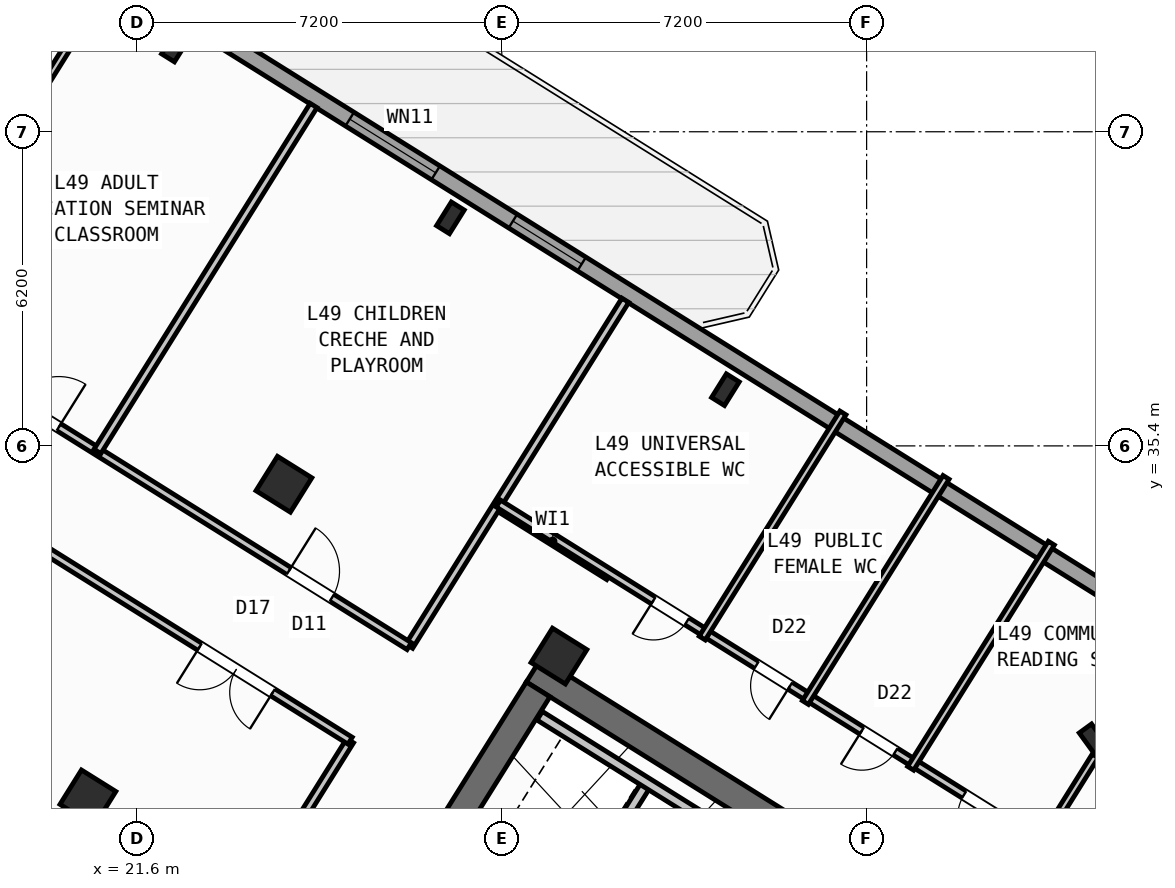
"""IFC4 building model, lengths in metres.
Left out: names, types, materials, properties, quantities, classifications, styles, units other than length and angle.
Written with IfcOpenShell. Run it as: python <this file> out.ifc"""

import sys

from ifc_helpers import new_model, si_unit, direction, frame, frame_2d, origin, origin_2d, place, context, subcontext, project, spatial, rectangle, hollow_rectangle, i_section, extrude, source, transform, mapped, element, fill, save


model = new_model("IFC4")
c1 = context("Model", 3, precision=1e-05, world=origin(), true_north=direction((0.0, 1.0)))
c2 = subcontext(c1, "Body", "Model", "MODEL_VIEW")
j1 = project(units=[si_unit("LENGTHUNIT", "METRE"), si_unit("PLANEANGLEUNIT", "RADIAN")], contexts=[c1])
p1 = place(None, origin())
s1 = spatial("IfcSite", under=j1, at=p1, CompositionType="ELEMENT")
p2 = place(p1, origin())
s2 = spatial("IfcBuilding", under=s1, at=p2, CompositionType="ELEMENT")
p3 = place(p2, frame((0.0, 0.0, 195.0)))
s3 = spatial("IfcBuildingStorey", under=s2, at=p3, CompositionType="ELEMENT", Elevation=195.0)
p4 = place(p3, frame((40.573, 24.01, 0.0), z_axis=(0.0, 0.0, 1.0), x_axis=(-0.848047359947, 0.529920442413, 0.0)))
e1 = element("IfcWall", 1, at=p4, inside=s3, PredefinedType="SHEAR", context=c2, shape_type="SweptSolid", body=[
    extrude(rectangle(XDim=13.14, YDim=0.55, at=frame_2d((6.57, 0.0))), origin(), (0.0, 0.0, 1.0), 4.22),
])
p5 = place(p3, frame((29.517, 30.594, 0.0), z_axis=(0.0, 0.0, 1.0), x_axis=(-0.529906864564, -0.848055844204, 0.0)))
e2 = element("IfcWall", 2, at=p5, inside=s3, PredefinedType="SHEAR", context=c2, shape_type="SweptSolid", body=[
    extrude(rectangle(XDim=3.575, YDim=0.55, at=frame_2d((1.788, 0.0))), origin(), (0.0, 0.0, 1.0), 4.22),
])
m1 = source(origin(), c2, "Body", "SweptSolid", [
    extrude(i_section(OverallWidth=0.3, OverallDepth=0.55, WebThickness=0.015, FlangeThickness=0.029, at=origin_2d()), origin(), (0.0, 0.0, 1.0), 4.5),
])
p6 = place(p3, frame((33.213, 36.509, 0.0), z_axis=(0.0, 0.0, 1.0), x_axis=(-0.848048096156, 0.529919264233, 0.0)))
e3 = element("IfcColumn", 3, at=p6, inside=s3, PredefinedType="COLUMN", context=c2, shape_type="MappedRepresentation", body=[
    mapped(m1, transform((0.0, 0.0, 0.0), scale=1.0)),
])
m2 = source(origin(), c2, "Body", "SweptSolid", [
    extrude(hollow_rectangle(XDim=0.8, YDim=0.8, WallThickness=0.032, at=origin_2d()), origin(), (0.0, 0.0, 1.0), 4.5),
])
p7 = place(p3, frame((29.928, 31.251, 0.0), z_axis=(0.0, 0.0, 1.0), x_axis=(-0.848048096156, 0.529919264233, 0.0)))
e4 = element("IfcColumn", 4, at=p7, inside=s3, PredefinedType="COLUMN", context=c2, shape_type="MappedRepresentation", body=[
    mapped(m2, transform((0.0, 0.0, 0.0), scale=1.0)),
])
p8 = place(p3, frame((27.786, 39.901, 0.0), z_axis=(0.0, 0.0, 1.0), x_axis=(-0.848048096156, 0.529919264233, 0.0)))
e5 = element("IfcColumn", 5, at=p8, inside=s3, PredefinedType="COLUMN", context=c2, shape_type="MappedRepresentation", body=[
    mapped(m1, transform((0.0, 0.0, 0.0), scale=1.0)),
])
for number, where, z_axis, x_axis in (
    (6, (24.5, 34.643, 0.0), (0.0, 0.0, 1.0), (-0.848, 0.53, 0.0)),
    (7, (20.632, 28.452, 0.0), (0.0, 0.0, 1.0), (-0.848, 0.53, 0.0)),
):
    element("IfcColumn", number, at=place(p3, frame(where, z_axis=z_axis, x_axis=x_axis)), inside=s3, PredefinedType="COLUMN", context=c2, shape_type="MappedRepresentation", body=[
        mapped(m2, transform((0.0, 0.0, 0.0), scale=1.0)),
    ])
for number, where, z_axis, x_axis in (
    (8, (22.358, 43.292, 0.0), (0.0, 0.0, 1.0), (-0.848, 0.53, 0.0)),
    (9, (40.479, 29.601, 0.0), (0.0, 0.0, 1.0), (0.809, 0.588, 0.0)),
):
    element("IfcColumn", number, at=place(p3, frame(where, z_axis=z_axis, x_axis=x_axis)), inside=s3, PredefinedType="COLUMN", context=c2, shape_type="MappedRepresentation", body=[
        mapped(m1, transform((0.0, 0.0, 0.0), scale=1.0)),
    ])
p9 = place(p3, frame((31.76, 12.183, 0.0), z_axis=(0.0, 0.0, 1.0), x_axis=(-0.848047074256, 0.529920899612, 0.0)))
e10 = element("IfcWall", 10, at=p9, inside=s3, PredefinedType="STANDARD", context=c2, shape_type="SweptSolid", body=[
    extrude(rectangle(XDim=30.652, YDim=0.32, at=frame_2d((15.326, 0.0))), origin(), (0.0, 0.0, 1.0), 4.22),
])
p10 = place(p9, frame((15.166, 0.0, 0.0)))
e11 = element("IfcOpeningElement", 11, at=p10, cuts=e10, PredefinedType="OPENING", context=c2, shape_type="SweptSolid", body=[
    extrude(rectangle(XDim=1.2, YDim=2.15, at=frame_2d((0.6, 1.075))), frame((0.0, 0.17, 0.0), z_axis=(0.0, -1.0, 0.0), x_axis=(1.0, 0.0, 0.0)), (0.0, 0.0, 1.0), 0.34),
])
p11 = place(p9, frame((1.765, 0.0, 0.7)))
e12 = element("IfcOpeningElement", 12, at=p11, cuts=e10, PredefinedType="OPENING", context=c2, shape_type="SweptSolid", body=[
    extrude(rectangle(XDim=2.6, YDim=2.0, at=frame_2d((1.3, 1.0))), frame((0.0, 0.17, 0.0), z_axis=(0.0, -1.0, 0.0), x_axis=(1.0, 0.0, 0.0)), (0.0, 0.0, 1.0), 0.34),
])
p12 = place(p9, frame((6.994, 0.0, 0.7)))
e13 = element("IfcOpeningElement", 13, at=p12, cuts=e10, PredefinedType="OPENING", context=c2, shape_type="SweptSolid", body=[
    extrude(rectangle(XDim=2.6, YDim=2.0, at=frame_2d((1.3, 1.0))), frame((0.0, 0.17, 0.0), z_axis=(0.0, -1.0, 0.0), x_axis=(1.0, 0.0, 0.0)), (0.0, 0.0, 1.0), 0.34),
])
p13 = place(p9, frame((19.101, 0.0, 0.85)))
e14 = element("IfcOpeningElement", 14, at=p13, cuts=e10, PredefinedType="OPENING", context=c2, shape_type="SweptSolid", body=[
    extrude(rectangle(XDim=1.6, YDim=1.8, at=frame_2d((0.8, 0.9))), frame((0.0, 0.17, 0.0), z_axis=(0.0, -1.0, 0.0), x_axis=(1.0, 0.0, 0.0)), (0.0, 0.0, 1.0), 0.34),
])
p14 = place(p9, frame((26.358, 0.0, 0.7)))
e15 = element("IfcOpeningElement", 15, at=p14, cuts=e10, PredefinedType="OPENING", context=c2, shape_type="SweptSolid", body=[
    extrude(rectangle(XDim=2.6, YDim=2.0, at=frame_2d((1.3, 1.0))), frame((0.0, 0.17, 0.0), z_axis=(0.0, -1.0, 0.0), x_axis=(1.0, 0.0, 0.0)), (0.0, 0.0, 1.0), 0.34),
])
p15 = place(p3, frame((17.424, 47.083, 0.0), z_axis=(0.0, 0.0, 1.0), x_axis=(0.848049927979, -0.529916332693, 0.0)))
e16 = element("IfcWall", 16, at=p15, inside=s3, PredefinedType="STANDARD", context=c2, shape_type="SweptSolid", body=[
    extrude(rectangle(XDim=29.223, YDim=0.32, at=frame_2d((14.612, 0.0))), origin(), (0.0, 0.0, 1.0), 4.22),
])
p16 = place(p15, frame((2.752, 0.0, 0.0)))
e17 = element("IfcOpeningElement", 17, at=p16, cuts=e16, PredefinedType="OPENING", context=c2, shape_type="SweptSolid", body=[
    extrude(rectangle(XDim=1.05, YDim=2.15, at=frame_2d((0.525, 1.075))), frame((0.0, 0.17, 0.0), z_axis=(0.0, -1.0, 0.0), x_axis=(1.0, 0.0, 0.0)), (0.0, 0.0, 1.0), 0.34),
])
p17 = place(p15, frame((0.641, 0.0, 0.85)))
e18 = element("IfcOpeningElement", 18, at=p17, cuts=e16, PredefinedType="OPENING", context=c2, shape_type="SweptSolid", body=[
    extrude(rectangle(XDim=1.6, YDim=1.8, at=frame_2d((0.8, 0.9))), frame((0.0, 0.17, 0.0), z_axis=(0.0, -1.0, 0.0), x_axis=(1.0, 0.0, 0.0)), (0.0, 0.0, 1.0), 0.34),
])
p18 = place(p15, frame((9.876, 0.0, 0.75)))
e19 = element("IfcOpeningElement", 19, at=p18, cuts=e16, PredefinedType="OPENING", context=c2, shape_type="SweptSolid", body=[
    extrude(rectangle(XDim=2.0, YDim=1.95, at=frame_2d((1.0, 0.975))), frame((0.0, 0.17, 0.0), z_axis=(0.0, -1.0, 0.0), x_axis=(1.0, 0.0, 0.0)), (0.0, 0.0, 1.0), 0.34),
])
p19 = place(p15, frame((13.674, 0.0, 0.85)))
e20 = element("IfcOpeningElement", 20, at=p19, cuts=e16, PredefinedType="OPENING", context=c2, shape_type="SweptSolid", body=[
    extrude(rectangle(XDim=1.6, YDim=1.8, at=frame_2d((0.8, 0.9))), frame((0.0, 0.17, 0.0), z_axis=(0.0, -1.0, 0.0), x_axis=(1.0, 0.0, 0.0)), (0.0, 0.0, 1.0), 0.34),
])
p20 = place(p3, frame((31.645, 28.716, 0.0), z_axis=(0.0, 0.0, 1.0), x_axis=(-0.52986693015, -0.848080795876, 0.0)))
e21 = element("IfcWall", 21, at=p20, inside=s3, PredefinedType="STANDARD", context=c2, shape_type="SweptSolid", body=[
    extrude(rectangle(XDim=2.66, YDim=0.2, at=frame_2d((1.33, 0.0))), origin(), (0.0, 0.0, 1.0), 4.21),
])
p21 = place(p3, frame((33.363, 27.69, 0.0), z_axis=(0.0, 0.0, 1.0), x_axis=(-0.848047090064, 0.529920874315, 0.0)))
e22 = element("IfcWall", 22, at=p21, inside=s3, PredefinedType="STANDARD", context=c2, shape_type="SweptSolid", body=[
    extrude(rectangle(XDim=4.498, YDim=0.2, at=frame_2d((2.249, 0.0))), origin(), (0.0, 0.0, 1.0), 4.21),
])
p22 = place(p3, frame((30.914, 32.829, 0.0), z_axis=(0.0, 0.0, 1.0), x_axis=(-0.848008813643, 0.529982124211, 0.0)))
e23 = element("IfcWall", 23, at=p22, inside=s3, PredefinedType="PARTITIONING", context=c2, shape_type="SweptSolid", body=[
    extrude(rectangle(XDim=2.61, YDim=0.16, at=frame_2d((1.305, 0.0))), origin(), (0.0, 0.0, 1.0), 4.21),
])
p23 = place(p3, frame((31.239, 38.274, 0.0), z_axis=(0.0, 0.0, 1.0), x_axis=(-0.529928058306, -0.848042600947, 0.0)))
e24 = element("IfcWall", 24, at=p23, inside=s3, PredefinedType="PARTITIONING", context=c2, shape_type="SweptSolid", body=[
    extrude(rectangle(XDim=8.05, YDim=0.16, at=frame_2d((4.025, 0.0))), origin(), (0.0, 0.0, 1.0), 4.21),
])
p24 = place(p3, frame((25.807, 29.582, 0.0), z_axis=(0.0, 0.0, 1.0), x_axis=(-0.529920357077, -0.848047413271, 0.0)))
e25 = element("IfcWall", 25, at=p24, inside=s3, PredefinedType="PARTITIONING", context=c2, shape_type="SweptSolid", body=[
    extrude(rectangle(XDim=11.45, YDim=0.16, at=frame_2d((5.725, 0.0))), origin(), (0.0, 0.0, 1.0), 4.21),
])
p25 = place(p3, frame((26.973, 31.447, 0.0), z_axis=(0.0, 0.0, 1.0), x_axis=(-0.848048310262, 0.529918921593, 0.0)))
e26 = element("IfcWall", 26, at=p25, inside=s3, PredefinedType="PARTITIONING", context=c2, shape_type="SweptSolid", body=[
    extrude(rectangle(XDim=16.73, YDim=0.16, at=frame_2d((8.365, 0.0))), origin(), (0.0, 0.0, 1.0), 4.21),
])
p26 = place(p25, frame((1.8, 0.0, 0.0)))
e27 = element("IfcOpeningElement", 27, at=p26, cuts=e26, PredefinedType="OPENING", context=c2, shape_type="SweptSolid", body=[
    extrude(rectangle(XDim=1.0, YDim=2.1, at=frame_2d((0.5, 1.05))), frame((0.0, 0.09, 0.0), z_axis=(0.0, -1.0, 0.0), x_axis=(1.0, 0.0, 0.0)), (0.0, 0.0, 1.0), 0.18),
])
p27 = place(p25, frame((8.155, 0.0, 0.0)))
e28 = element("IfcOpeningElement", 28, at=p27, cuts=e26, PredefinedType="OPENING", context=c2, shape_type="SweptSolid", body=[
    extrude(rectangle(XDim=1.0, YDim=2.1, at=frame_2d((0.5, 1.05))), frame((0.0, 0.09, 0.0), z_axis=(0.0, -1.0, 0.0), x_axis=(1.0, 0.0, 0.0)), (0.0, 0.0, 1.0), 0.18),
])
p28 = place(p25, frame((12.882, 0.0, 0.0)))
e29 = element("IfcOpeningElement", 29, at=p28, cuts=e26, PredefinedType="OPENING", context=c2, shape_type="SweptSolid", body=[
    extrude(rectangle(XDim=1.0, YDim=2.1, at=frame_2d((0.5, 1.05))), frame((0.0, 0.09, 0.0), z_axis=(0.0, -1.0, 0.0), x_axis=(1.0, 0.0, 0.0)), (0.0, 0.0, 1.0), 0.18),
])
p29 = place(p3, frame((25.807, 29.582, 0.0), z_axis=(0.0, 0.0, 1.0), x_axis=(-0.848052408131, 0.529912363569, 0.0)))
e30 = element("IfcWall", 30, at=p29, inside=s3, PredefinedType="PARTITIONING", context=c2, shape_type="SweptSolid", body=[
    extrude(rectangle(XDim=16.73, YDim=0.16, at=frame_2d((8.365, 0.0))), origin(), (0.0, 0.0, 1.0), 4.21),
])
p30 = place(p29, frame((1.8, 0.0, 0.0)))
e31 = element("IfcOpeningElement", 31, at=p30, cuts=e30, PredefinedType="OPENING", context=c2, shape_type="SweptSolid", body=[
    extrude(rectangle(XDim=1.7, YDim=2.2, at=frame_2d((0.85, 1.1))), frame((0.0, 0.09, 0.0), z_axis=(0.0, -1.0, 0.0), x_axis=(1.0, 0.0, 0.0)), (0.0, 0.0, 1.0), 0.18),
])
p31 = place(p29, frame((8.655, 0.0, 0.0)))
e32 = element("IfcOpeningElement", 32, at=p31, cuts=e30, PredefinedType="OPENING", context=c2, shape_type="SweptSolid", body=[
    extrude(rectangle(XDim=1.7, YDim=2.2, at=frame_2d((0.85, 1.1))), frame((0.0, 0.09, 0.0), z_axis=(0.0, -1.0, 0.0), x_axis=(1.0, 0.0, 0.0)), (0.0, 0.0, 1.0), 0.18),
])
p32 = place(p3, frame((25.086, 42.118, 0.0), z_axis=(0.0, 0.0, 1.0), x_axis=(-0.529928058306, -0.848042600947, 0.0)))
e33 = element("IfcWall", 33, at=p32, inside=s3, PredefinedType="PARTITIONING", context=c2, shape_type="SweptSolid", body=[
    extrude(rectangle(XDim=8.05, YDim=0.16, at=frame_2d((4.025, 0.0))), origin(), (0.0, 0.0, 1.0), 4.21),
])
p33 = place(p3, frame((21.157, 44.751, 0.0), z_axis=(0.0, 0.0, 1.0), x_axis=(-0.529924004437, -0.84804513413, 0.0)))
e34 = element("IfcWall", 34, at=p33, inside=s3, PredefinedType="PLUMBINGWALL", context=c2, shape_type="SweptSolid", body=[
    extrude(rectangle(XDim=8.2, YDim=0.14, at=frame_2d((4.1, 0.0))), origin(), (0.0, 0.0, 1.0), 4.21),
])
p34 = place(p3, frame((41.936, 26.012, 0.0), z_axis=(0.0, 0.0, 1.0), x_axis=(-0.848051154596, 0.529914369676, 0.0)))
e35 = element("IfcWall", 35, at=p34, inside=s3, PredefinedType="PARTITIONING", context=c2, shape_type="SweptSolid", body=[
    extrude(rectangle(XDim=15.57, YDim=0.16, at=frame_2d((7.785, 0.0))), origin(), (0.0, 0.0, 1.0), 4.21),
])
p35 = place(p34, frame((0.85, 0.0, 0.0)))
e36 = element("IfcOpeningElement", 36, at=p35, cuts=e35, PredefinedType="OPENING", context=c2, shape_type="SweptSolid", body=[
    extrude(rectangle(XDim=0.86, YDim=2.05, at=frame_2d((0.43, 1.025))), frame((0.0, 0.09, 0.0), z_axis=(0.0, -1.0, 0.0), x_axis=(1.0, 0.0, 0.0)), (0.0, 0.0, 1.0), 0.18),
])
p36 = place(p34, frame((3.87, 0.0, 0.0)))
e37 = element("IfcOpeningElement", 37, at=p36, cuts=e35, PredefinedType="OPENING", context=c2, shape_type="SweptSolid", body=[
    extrude(rectangle(XDim=0.86, YDim=2.05, at=frame_2d((0.43, 1.025))), frame((0.0, 0.09, 0.0), z_axis=(0.0, -1.0, 0.0), x_axis=(1.0, 0.0, 0.0)), (0.0, 0.0, 1.0), 0.18),
])
p37 = place(p34, frame((6.33, 0.0, 0.0)))
e38 = element("IfcOpeningElement", 38, at=p37, cuts=e35, PredefinedType="OPENING", context=c2, shape_type="SweptSolid", body=[
    extrude(rectangle(XDim=0.78, YDim=2.05, at=frame_2d((0.39, 1.025))), frame((0.0, 0.09, 0.0), z_axis=(0.0, -1.0, 0.0), x_axis=(1.0, 0.0, 0.0)), (0.0, 0.0, 1.0), 0.18),
])
p38 = place(p34, frame((8.78, 0.0, 0.0)))
e39 = element("IfcOpeningElement", 39, at=p38, cuts=e35, PredefinedType="OPENING", context=c2, shape_type="SweptSolid", body=[
    extrude(rectangle(XDim=0.78, YDim=2.05, at=frame_2d((0.39, 1.025))), frame((0.0, 0.09, 0.0), z_axis=(0.0, -1.0, 0.0), x_axis=(1.0, 0.0, 0.0)), (0.0, 0.0, 1.0), 0.18),
])
p39 = place(p34, frame((11.18, 0.0, 0.0)))
e40 = element("IfcOpeningElement", 40, at=p39, cuts=e35, PredefinedType="OPENING", context=c2, shape_type="SweptSolid", body=[
    extrude(rectangle(XDim=0.78, YDim=2.05, at=frame_2d((0.39, 1.025))), frame((0.0, 0.09, 0.0), z_axis=(0.0, -1.0, 0.0), x_axis=(1.0, 0.0, 0.0)), (0.0, 0.0, 1.0), 0.18),
])
p40 = place(p3, frame((40.512, 29.281, 0.0), z_axis=(0.0, 0.0, 1.0), x_axis=(-0.529935255849, -0.848038103276, 0.0)))
e41 = element("IfcWall", 41, at=p40, inside=s3, PredefinedType="PLUMBINGWALL", context=c2, shape_type="SweptSolid", body=[
    extrude(rectangle(XDim=2.068, YDim=0.14, at=frame_2d((1.034, 0.0))), origin(), (0.0, 0.0, 1.0), 4.21),
])
for number, where, z_axis, x_axis in (
    (42, (39.646, 33.48, 0.0), (0.0, 0.0, 1.0), (-0.53, -0.848, 0.0)),
    (43, (37.568, 34.779, 0.0), (0.0, 0.0, 1.0), (-0.53, -0.848, 0.0)),
    (44, (35.533, 36.051, 0.0), (0.0, 0.0, 1.0), (-0.53, -0.848, 0.0)),
):
    element("IfcWall", number, at=place(p3, frame(where, z_axis=z_axis, x_axis=x_axis)), inside=s3, PredefinedType="PLUMBINGWALL", context=c2, shape_type="SweptSolid", body=[
        extrude(rectangle(XDim=5.24, YDim=0.14, at=frame_2d((2.62, 0.0))), origin(), (0.0, 0.0, 1.0), 4.21),
    ])
m3 = source(origin(), c2, "Body", "SweptSolid", [
    extrude(rectangle(XDim=2.0, YDim=1.95, at=frame_2d((1.0, 0.975))), frame((0.0, 0.03, 0.0), z_axis=(0.0, -1.0, 0.0), x_axis=(1.0, 0.0, 0.0)), (0.0, 0.0, 1.0), 0.06),
])
p41 = place(p18, origin())
e45 = element("IfcWindow", 45, at=p41, inside=s3, PartitioningType="SINGLE_PANEL", PredefinedType="WINDOW", context=c2, shape_type="MappedRepresentation", body=[
    mapped(m3, transform((0.0, 0.0, 0.0), scale=1.0)),
])
fill(e19, e45)
m4 = source(origin(), c2, "Body", "SweptSolid", [
    extrude(rectangle(XDim=1.6, YDim=1.8, at=frame_2d((0.8, 0.9))), frame((0.0, 0.03, 0.0), z_axis=(0.0, -1.0, 0.0), x_axis=(1.0, 0.0, 0.0)), (0.0, 0.0, 1.0), 0.06),
])
p42 = place(p19, origin())
e46 = element("IfcWindow", 46, at=p42, inside=s3, PartitioningType="SINGLE_PANEL", PredefinedType="WINDOW", context=c2, shape_type="MappedRepresentation", body=[
    mapped(m4, transform((0.0, 0.0, 0.0), scale=1.0)),
])
fill(e20, e46)
m5 = source(origin(), c2, "Body", "SweptSolid", [
    extrude(rectangle(XDim=1.7, YDim=2.2, at=frame_2d((0.85, 1.1))), frame((0.0, 0.025, 0.0), z_axis=(0.0, -1.0, 0.0), x_axis=(1.0, 0.0, 0.0)), (0.0, 0.0, 1.0), 0.05),
])
p43 = place(p30, origin())
e47 = element("IfcDoor", 47, at=p43, inside=s3, OperationType="DOUBLE_DOOR_SINGLE_SWING", PredefinedType="DOOR", context=c2, shape_type="MappedRepresentation", body=[
    mapped(m5, transform((0.0, 0.0, 0.0), scale=1.0)),
])
fill(e31, e47)
m6 = source(origin(), c2, "Body", "SweptSolid", [
    extrude(rectangle(XDim=1.0, YDim=2.1, at=frame_2d((0.5, 1.05))), frame((0.0, 0.025, 0.0), z_axis=(0.0, -1.0, 0.0), x_axis=(1.0, 0.0, 0.0)), (0.0, 0.0, 1.0), 0.05),
])
p44 = place(p26, frame((1.0, 0.0, 0.0), z_axis=(0.0, 0.0, 1.0), x_axis=(-1.0, 0.0, 0.0)))
e48 = element("IfcDoor", 48, at=p44, inside=s3, OperationType="SINGLE_SWING_LEFT", PredefinedType="DOOR", context=c2, shape_type="MappedRepresentation", body=[
    mapped(m6, transform((0.0, 0.0, 0.0), scale=1.0)),
])
fill(e27, e48)
p45 = place(p27, frame((1.0, 0.0, 0.0), z_axis=(0.0, 0.0, 1.0), x_axis=(-1.0, 0.0, 0.0)))
e49 = element("IfcDoor", 49, at=p45, inside=s3, OperationType="SINGLE_SWING_RIGHT", PredefinedType="DOOR", context=c2, shape_type="MappedRepresentation", body=[
    mapped(m6, transform((0.0, 0.0, 0.0), scale=1.0)),
])
fill(e28, e49)
m7 = source(origin(), c2, "Body", "SweptSolid", [
    extrude(rectangle(XDim=0.86, YDim=2.05, at=frame_2d((0.43, 1.025))), frame((0.0, 0.025, 0.0), z_axis=(0.0, -1.0, 0.0), x_axis=(1.0, 0.0, 0.0)), (0.0, 0.0, 1.0), 0.05),
])
p46 = place(p36, origin())
e50 = element("IfcDoor", 50, at=p46, inside=s3, OperationType="SINGLE_SWING_LEFT", PredefinedType="DOOR", context=c2, shape_type="MappedRepresentation", body=[
    mapped(m7, transform((0.0, 0.0, 0.0), scale=1.0)),
])
fill(e37, e50)
m8 = source(origin(), c2, "Body", "SweptSolid", [
    extrude(rectangle(XDim=0.78, YDim=2.05, at=frame_2d((0.39, 1.025))), frame((0.0, 0.025, 0.0), z_axis=(0.0, -1.0, 0.0), x_axis=(1.0, 0.0, 0.0)), (0.0, 0.0, 1.0), 0.05),
])
p47 = place(p37, origin())
e51 = element("IfcDoor", 51, at=p47, inside=s3, OperationType="SINGLE_SWING_RIGHT", PredefinedType="DOOR", context=c2, shape_type="MappedRepresentation", body=[
    mapped(m8, transform((0.0, 0.0, 0.0), scale=1.0)),
])
fill(e38, e51)
p48 = place(p38, origin())
e52 = element("IfcDoor", 52, at=p48, inside=s3, OperationType="SINGLE_SWING_LEFT", PredefinedType="DOOR", context=c2, shape_type="MappedRepresentation", body=[
    mapped(m8, transform((0.0, 0.0, 0.0), scale=1.0)),
])
fill(e39, e52)
p49 = place(p39, origin())
e53 = element("IfcDoor", 53, at=p49, inside=s3, OperationType="SINGLE_SWING_RIGHT", PredefinedType="DOOR", context=c2, shape_type="MappedRepresentation", body=[
    mapped(m8, transform((0.0, 0.0, 0.0), scale=1.0)),
])
fill(e40, e53)
save(model, sys.argv[1])
